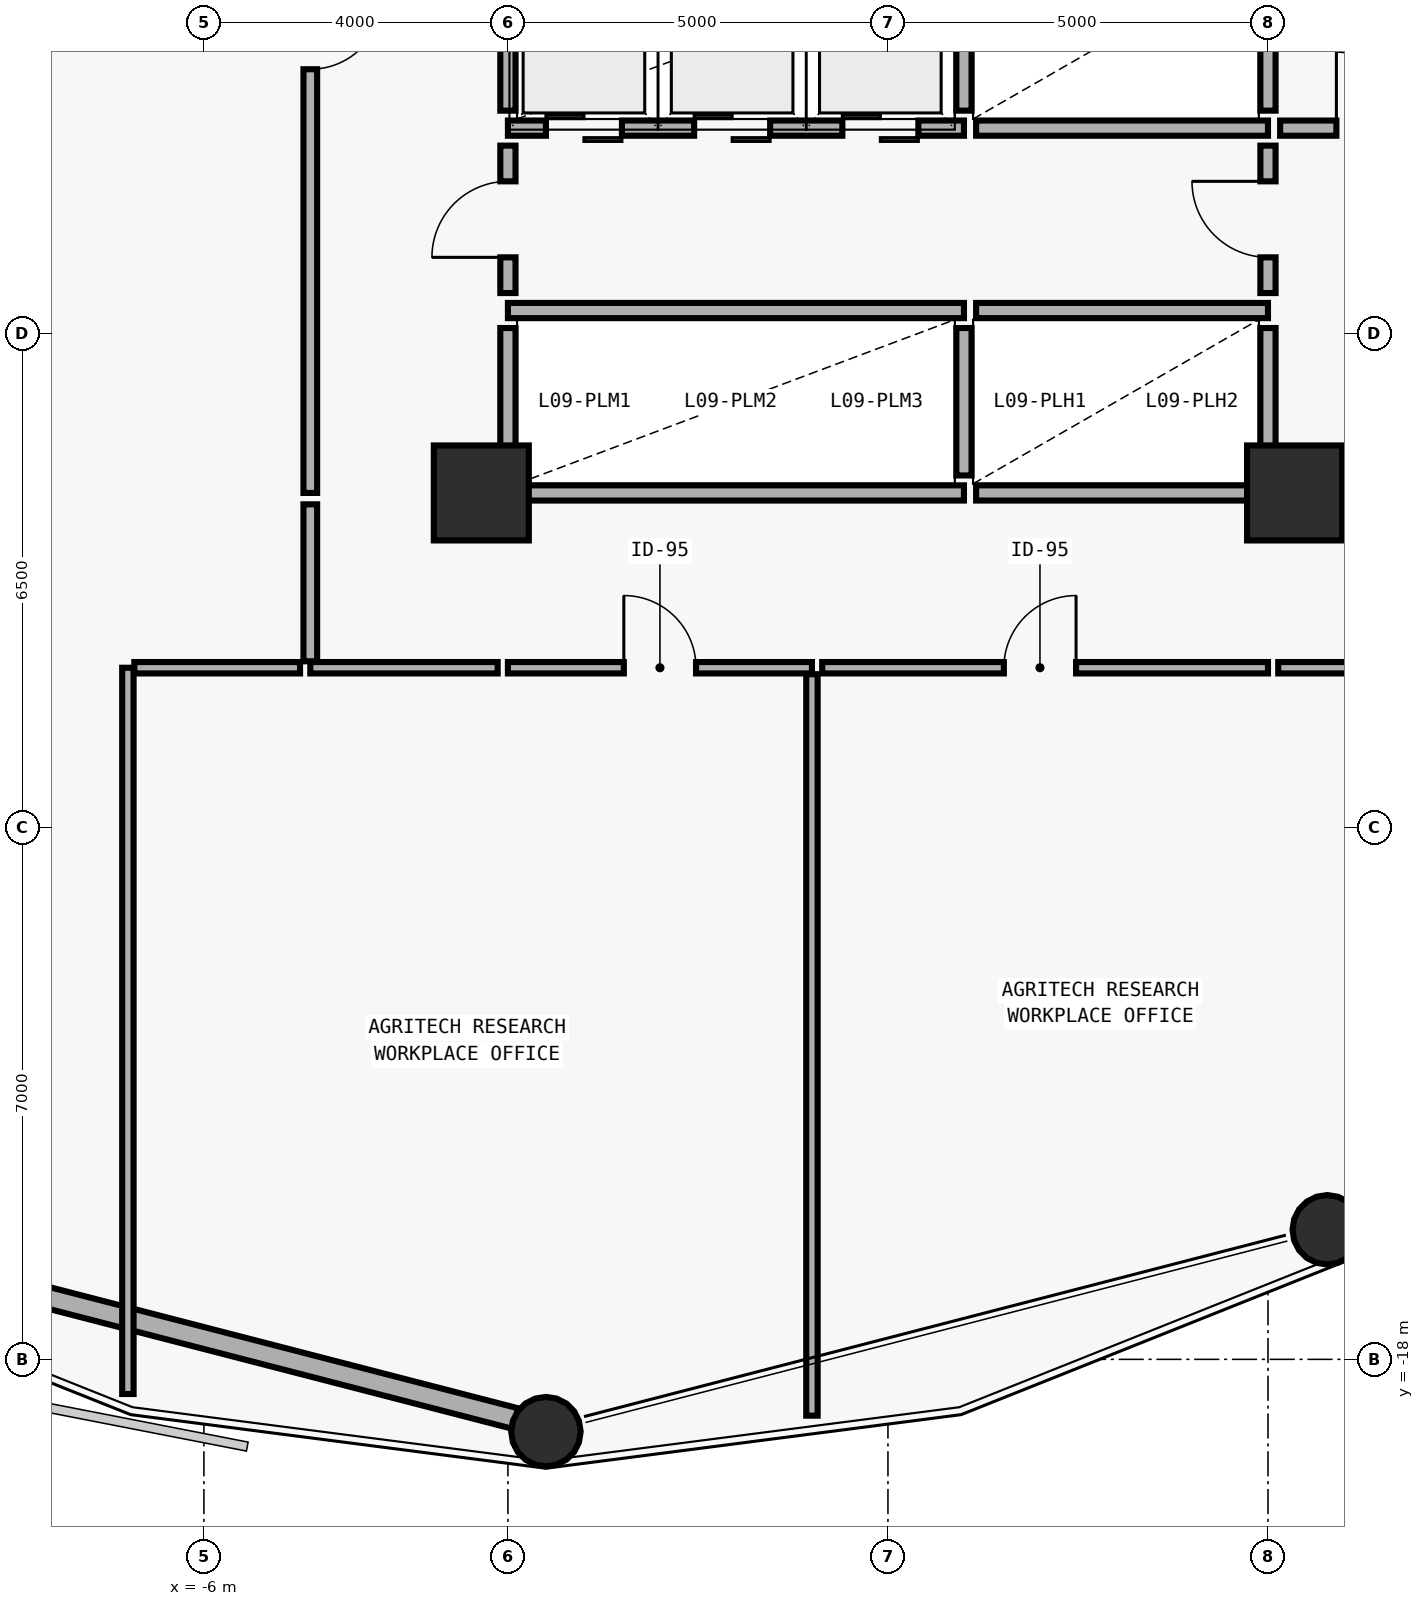
"""IFC4 building model, lengths in metres.
Left out: names, types, materials, properties, quantities, classifications, styles, units other than length and angle.
Written with IfcOpenShell. Run it as: python <this file> out.ifc"""

import sys

from ifc_helpers import new_model, si_unit, direction, frame, frame_2d, origin, origin_2d, place, context, subcontext, project, spatial, rectangle, hollow_circle, extrude, element, fill, save


model = new_model("IFC4")
c1 = context("Model", 3, precision=1e-05, world=origin(), true_north=direction((0.0, 1.0)))
c2 = subcontext(c1, "Body", "Model", "MODEL_VIEW")
j1 = project(units=[si_unit("LENGTHUNIT", "METRE"), si_unit("PLANEANGLEUNIT", "RADIAN")], contexts=[c1])
p1 = place(None, origin())
s1 = spatial("IfcSite", under=j1, at=p1, CompositionType="ELEMENT")
p2 = place(p1, origin())
s2 = spatial("IfcBuilding", under=s1, at=p2, CompositionType="ELEMENT")
p3 = place(p2, frame((0.0, 0.0, 39.3)))
s3 = spatial("IfcBuildingStorey", under=s2, at=p3, CompositionType="ELEMENT", Elevation=39.3)
for number, where, z_axis, x_axis in (
    (1, (-2.35, -6.6, 0.0), (0.0, 0.0, 1.0), (1.0, 0.0, 0.0)),
    (2, (8.35, -6.6, 0.0), (0.0, 0.0, 1.0), (1.0, 0.0, 0.0)),
):
    element("IfcColumn", number, at=place(p3, frame(where, z_axis=z_axis, x_axis=x_axis)), inside=s3, PredefinedType="COLUMN", context=c2, shape_type="SweptSolid", body=[
        extrude(rectangle(XDim=1.25, YDim=1.25, at=origin_2d()), origin(), (0.0, 0.0, 1.0), 3.875),
    ])
p4 = place(p3, frame((-1.5, -18.883, 0.0), z_axis=(0.0, -0.03507165661, 0.999384800216), x_axis=(1.0, 0.0, 0.0)))
e3 = element("IfcColumn", 3, at=p4, inside=s3, PredefinedType="COLUMN", context=c2, shape_type="SweptSolid", body=[
    extrude(hollow_circle(Radius=0.457, WallThickness=0.032, at=origin_2d()), origin(), (0.0, 0.0, 1.0), 3.877),
])
p5 = place(p3, frame((8.736, -16.236, 0.0), z_axis=(0.022665133029, -0.030409053481, 0.999280531788), x_axis=(0.801789249334, 0.597606893913, 0.0)))
e4 = element("IfcColumn", 4, at=p5, inside=s3, PredefinedType="COLUMN", context=c2, shape_type="SweptSolid", body=[
    extrude(hollow_circle(Radius=0.457, WallThickness=0.032, at=origin_2d()), origin(), (0.0, 0.0, 1.0), 3.878),
])
p6 = place(p3, frame((-1.899, -18.78, 0.0), z_axis=(0.0, 0.0, 1.0), x_axis=(-0.968156017529, 0.250347609779, 0.0)))
e5 = element("IfcWall", 5, at=p6, inside=s3, PredefinedType="SOLIDWALL", context=c2, shape_type="SweptSolid", body=[
    extrude(rectangle(XDim=9.748, YDim=0.28, at=frame_2d((4.874, 0.0))), origin(), (0.0, 0.0, 1.0), 3.06),
])
p7 = place(p3, frame((-2.0, -1.8, 0.0), z_axis=(0.0, 0.0, 1.0), x_axis=(1.0, 0.0, 0.0)))
e6 = element("IfcWall", 6, at=p7, inside=s3, PredefinedType="SOLIDWALL", context=c2, shape_type="SweptSolid", body=[
    extrude(rectangle(XDim=6.0, YDim=0.2, at=frame_2d((3.0, 0.0))), origin(), (0.0, 0.0, 1.0), 3.64),
])
p8 = place(p7, frame((0.5, 0.0, 0.0)))
e7 = element("IfcOpeningElement", 7, at=p8, cuts=e6, PredefinedType="OPENING", context=c2, shape_type="SweptSolid", body=[
    extrude(rectangle(XDim=1.0, YDim=2.2, at=frame_2d((0.5, 1.1))), frame((0.0, 0.11, 0.0), z_axis=(0.0, -1.0, 0.0), x_axis=(1.0, 0.0, 0.0)), (0.0, 0.0, 1.0), 0.22),
])
p9 = place(p7, frame((2.45, 0.0, 0.0)))
e8 = element("IfcOpeningElement", 8, at=p9, cuts=e6, PredefinedType="OPENING", context=c2, shape_type="SweptSolid", body=[
    extrude(rectangle(XDim=1.0, YDim=2.2, at=frame_2d((0.5, 1.1))), frame((0.0, 0.11, 0.0), z_axis=(0.0, -1.0, 0.0), x_axis=(1.0, 0.0, 0.0)), (0.0, 0.0, 1.0), 0.22),
])
p10 = place(p7, frame((4.4, 0.0, 0.0)))
e9 = element("IfcOpeningElement", 9, at=p10, cuts=e6, PredefinedType="OPENING", context=c2, shape_type="SweptSolid", body=[
    extrude(rectangle(XDim=1.0, YDim=2.2, at=frame_2d((0.5, 1.1))), frame((0.0, 0.11, 0.0), z_axis=(0.0, -1.0, 0.0), x_axis=(1.0, 0.0, 0.0)), (0.0, 0.0, 1.0), 0.22),
])
p11 = place(p3, frame((-2.0, -1.57, 0.0), z_axis=(0.0, 0.0, 1.0), x_axis=(0.0, 1.0, 0.0)))
e10 = element("IfcWall", 10, at=p11, inside=s3, PredefinedType="SOLIDWALL", context=c2, shape_type="SweptSolid", body=[
    extrude(rectangle(XDim=2.05, YDim=0.2, at=frame_2d((1.025, 0.0))), origin(), (0.0, 0.0, 1.0), 3.022),
])
p12 = place(p3, frame((4.16, -1.8, 0.0), z_axis=(0.0, 0.0, 1.0), x_axis=(1.0, 0.0, 0.0)))
e11 = element("IfcWall", 11, at=p12, inside=s3, PredefinedType="SOLIDWALL", context=c2, shape_type="SweptSolid", body=[
    extrude(rectangle(XDim=3.84, YDim=0.2, at=frame_2d((1.92, 0.0))), origin(), (0.0, 0.0, 1.0), 3.64),
])
p13 = place(p3, frame((4.0, -1.57, 0.0), z_axis=(0.0, 0.0, 1.0), x_axis=(0.0, 1.0, 0.0)))
e12 = element("IfcWall", 12, at=p13, inside=s3, PredefinedType="SOLIDWALL", context=c2, shape_type="SweptSolid", body=[
    extrude(rectangle(XDim=1.94, YDim=0.2, at=frame_2d((0.97, 0.0))), origin(), (0.0, 0.0, 1.0), 3.64),
])
p14 = place(p3, frame((8.0, -1.57, 0.0), z_axis=(0.0, 0.0, 1.0), x_axis=(0.0, 1.0, 0.0)))
e13 = element("IfcWall", 13, at=p14, inside=s3, PredefinedType="SOLIDWALL", context=c2, shape_type="SweptSolid", body=[
    extrude(rectangle(XDim=2.05, YDim=0.2, at=frame_2d((1.025, 0.0))), origin(), (0.0, 0.0, 1.0), 3.072),
])
p15 = place(p3, frame((-2.0, -4.2, 0.0), z_axis=(0.0, 0.0, 1.0), x_axis=(1.0, 0.0, 0.0)))
e14 = element("IfcWall", 14, at=p15, inside=s3, PredefinedType="SOLIDWALL", context=c2, shape_type="SweptSolid", body=[
    extrude(rectangle(XDim=6.0, YDim=0.2, at=frame_2d((3.0, 0.0))), origin(), (0.0, 0.0, 1.0), 3.64),
])
p16 = place(p3, frame((-2.0, -6.6, 0.0), z_axis=(0.0, 0.0, 1.0), x_axis=(1.0, 0.0, 0.0)))
e15 = element("IfcWall", 15, at=p16, inside=s3, PredefinedType="SOLIDWALL", context=c2, shape_type="SweptSolid", body=[
    extrude(rectangle(XDim=6.0, YDim=0.2, at=frame_2d((3.0, 0.0))), origin(), (0.0, 0.0, 1.0), 3.122),
])
p17 = place(p3, frame((-2.0, -6.37, 0.0), z_axis=(0.0, 0.0, 1.0), x_axis=(0.0, 1.0, 0.0)))
e16 = element("IfcWall", 16, at=p17, inside=s3, PredefinedType="SOLIDWALL", context=c2, shape_type="SweptSolid", body=[
    extrude(rectangle(XDim=1.94, YDim=0.2, at=frame_2d((0.97, 0.0))), origin(), (0.0, 0.0, 1.0), 3.022),
])
p18 = place(p3, frame((4.16, -4.2, 0.0), z_axis=(0.0, 0.0, 1.0), x_axis=(1.0, 0.0, 0.0)))
e17 = element("IfcWall", 17, at=p18, inside=s3, PredefinedType="SOLIDWALL", context=c2, shape_type="SweptSolid", body=[
    extrude(rectangle(XDim=3.84, YDim=0.2, at=frame_2d((1.92, 0.0))), origin(), (0.0, 0.0, 1.0), 3.64),
])
p19 = place(p3, frame((4.16, -6.6, 0.0), z_axis=(0.0, 0.0, 1.0), x_axis=(1.0, 0.0, 0.0)))
e18 = element("IfcWall", 18, at=p19, inside=s3, PredefinedType="SOLIDWALL", context=c2, shape_type="SweptSolid", body=[
    extrude(rectangle(XDim=3.84, YDim=0.2, at=frame_2d((1.92, 0.0))), origin(), (0.0, 0.0, 1.0), 3.122),
])
p20 = place(p3, frame((4.0, -6.37, 0.0), z_axis=(0.0, 0.0, 1.0), x_axis=(0.0, 1.0, 0.0)))
e19 = element("IfcWall", 19, at=p20, inside=s3, PredefinedType="SOLIDWALL", context=c2, shape_type="SweptSolid", body=[
    extrude(rectangle(XDim=1.94, YDim=0.2, at=frame_2d((0.97, 0.0))), origin(), (0.0, 0.0, 1.0), 3.64),
])
p21 = place(p3, frame((8.0, -6.37, 0.0), z_axis=(0.0, 0.0, 1.0), x_axis=(0.0, 1.0, 0.0)))
e20 = element("IfcWall", 20, at=p21, inside=s3, PredefinedType="SOLIDWALL", context=c2, shape_type="SweptSolid", body=[
    extrude(rectangle(XDim=1.94, YDim=0.2, at=frame_2d((0.97, 0.0))), origin(), (0.0, 0.0, 1.0), 3.072),
])
p22 = place(p3, frame((-2.0, -3.97, 0.0), z_axis=(0.0, 0.0, 1.0), x_axis=(0.0, 1.0, 0.0)))
e21 = element("IfcWall", 21, at=p22, inside=s3, PredefinedType="MOVABLE", context=c2, shape_type="SweptSolid", body=[
    extrude(rectangle(XDim=1.94, YDim=0.2, at=frame_2d((0.97, 0.0))), origin(), (0.0, 0.0, 1.0), 3.022),
])
p23 = place(p22, frame((0.47, 0.0, 0.0)))
e22 = element("IfcOpeningElement", 22, at=p23, cuts=e21, PredefinedType="OPENING", context=c2, shape_type="SweptSolid", body=[
    extrude(rectangle(XDim=1.0, YDim=2.1, at=frame_2d((0.5, 1.05))), frame((0.0, 0.11, 0.0), z_axis=(0.0, -1.0, 0.0), x_axis=(1.0, 0.0, 0.0)), (0.0, 0.0, 1.0), 0.22),
])
p24 = place(p3, frame((8.0, -3.97, 0.0), z_axis=(0.0, 0.0, 1.0), x_axis=(0.0, 1.0, 0.0)))
e23 = element("IfcWall", 23, at=p24, inside=s3, PredefinedType="MOVABLE", context=c2, shape_type="SweptSolid", body=[
    extrude(rectangle(XDim=1.94, YDim=0.2, at=frame_2d((0.97, 0.0))), origin(), (0.0, 0.0, 1.0), 3.072),
])
p25 = place(p24, frame((0.47, 0.0, 0.0)))
e24 = element("IfcOpeningElement", 24, at=p25, cuts=e23, PredefinedType="OPENING", context=c2, shape_type="SweptSolid", body=[
    extrude(rectangle(XDim=1.0, YDim=2.1, at=frame_2d((0.5, 1.05))), frame((0.0, 0.11, 0.0), z_axis=(0.0, -1.0, 0.0), x_axis=(1.0, 0.0, 0.0)), (0.0, 0.0, 1.0), 0.22),
])
p26 = place(p3, frame((8.16, -1.8, 0.0), z_axis=(0.0, 0.0, 1.0), x_axis=(1.0, 0.0, 0.0)))
e25 = element("IfcWall", 25, at=p26, inside=s3, PredefinedType="MOVABLE", context=c2, shape_type="SweptSolid", body=[
    extrude(rectangle(XDim=2.64, YDim=0.2, at=frame_2d((1.32, 0.0))), origin(), (0.0, 0.0, 1.0), 3.64),
])
p27 = place(p26, frame((0.74, 0.0, 0.0)))
e26 = element("IfcOpeningElement", 26, at=p27, cuts=e25, PredefinedType="OPENING", context=c2, shape_type="SweptSolid", body=[
    extrude(rectangle(XDim=1.0, YDim=2.1, at=frame_2d((0.5, 1.05))), frame((0.0, 0.11, 0.0), z_axis=(0.0, -1.0, 0.0), x_axis=(1.0, 0.0, 0.0)), (0.0, 0.0, 1.0), 0.22),
])
p28 = place(p3, frame((-2.0, -8.9, 0.0), z_axis=(0.0, 0.0, 1.0), x_axis=(1.0, 0.0, 0.0)))
e27 = element("IfcWall", 27, at=p28, inside=s3, PredefinedType="PARTITIONING", context=c2, shape_type="SweptSolid", body=[
    extrude(rectangle(XDim=4.0, YDim=0.15, at=frame_2d((2.0, 0.0))), origin(), (0.0, 0.0, 1.0), 3.64),
])
p29 = place(p28, frame((1.525, 0.0, 0.0)))
e28 = element("IfcOpeningElement", 28, at=p29, cuts=e27, PredefinedType="OPENING", context=c2, shape_type="SweptSolid", body=[
    extrude(rectangle(XDim=0.95, YDim=2.1, at=frame_2d((0.475, 1.05))), frame((0.0, 0.085, 0.0), z_axis=(0.0, -1.0, 0.0), x_axis=(1.0, 0.0, 0.0)), (0.0, 0.0, 1.0), 0.17),
])
p30 = place(p3, frame((2.135, -8.9, 0.0), z_axis=(0.0, 0.0, 1.0), x_axis=(1.0, 0.0, 0.0)))
e29 = element("IfcWall", 29, at=p30, inside=s3, PredefinedType="PARTITIONING", context=c2, shape_type="SweptSolid", body=[
    extrude(rectangle(XDim=5.865, YDim=0.15, at=frame_2d((2.933, 0.0))), origin(), (0.0, 0.0, 1.0), 3.64),
])
p31 = place(p30, frame((2.39, 0.0, 0.0)))
e30 = element("IfcOpeningElement", 30, at=p31, cuts=e29, PredefinedType="OPENING", context=c2, shape_type="SweptSolid", body=[
    extrude(rectangle(XDim=0.95, YDim=2.1, at=frame_2d((0.475, 1.05))), frame((0.0, 0.085, 0.0), z_axis=(0.0, -1.0, 0.0), x_axis=(1.0, 0.0, 0.0)), (0.0, 0.0, 1.0), 0.17),
])
p32 = place(p3, frame((-4.6, 5.5, 0.0), z_axis=(0.0, 0.0, 1.0), x_axis=(0.0, -1.0, 0.0)))
e31 = element("IfcWall", 31, at=p32, inside=s3, PredefinedType="PLUMBINGWALL", context=c2, shape_type="SweptSolid", body=[
    extrude(rectangle(XDim=12.1, YDim=0.18, at=frame_2d((6.05, 0.0))), origin(), (0.0, 0.0, 1.0), 3.64),
])
p33 = place(p32, frame((5.575, 0.0, 0.0)))
e32 = element("IfcOpeningElement", 32, at=p33, cuts=e31, PredefinedType="OPENING", context=c2, shape_type="SweptSolid", body=[
    extrude(rectangle(XDim=0.95, YDim=2.1, at=frame_2d((0.475, 1.05))), frame((0.0, 0.1, 0.0), z_axis=(0.0, -1.0, 0.0), x_axis=(1.0, 0.0, 0.0)), (0.0, 0.0, 1.0), 0.2),
])
p34 = place(p3, frame((-4.6, -8.9, 0.0), z_axis=(0.0, 0.0, 1.0), x_axis=(1.0, 0.0, 0.0)))
e33 = element("IfcWall", 33, at=p34, inside=s3, PredefinedType="PARTITIONING", context=c2, shape_type="SweptSolid", body=[
    extrude(rectangle(XDim=2.465, YDim=0.15, at=frame_2d((1.232, 0.0))), origin(), (0.0, 0.0, 1.0), 3.64),
])
p35 = place(p3, frame((2.0, -8.985, 0.0), z_axis=(0.0, 0.0, 1.0), x_axis=(0.0, -1.0, 0.0)))
e34 = element("IfcWall", 34, at=p35, inside=s3, PredefinedType="PARTITIONING", context=c2, shape_type="SweptSolid", body=[
    extrude(rectangle(XDim=9.756, YDim=0.15, at=frame_2d((4.878, 0.0))), origin(), (0.0, 0.0, 1.0), 3.64),
])
p36 = place(p3, frame((-7.0, -18.456, 0.0), z_axis=(0.0, 0.0, 1.0), x_axis=(0.0, 1.0, 0.0)))
e35 = element("IfcWall", 35, at=p36, inside=s3, PredefinedType="PARTITIONING", context=c2, shape_type="SweptSolid", body=[
    extrude(rectangle(XDim=9.556, YDim=0.15, at=frame_2d((4.778, 0.0))), origin(), (0.0, 0.0, 1.0), 3.64),
])
p37 = place(p3, frame((-6.915, -8.9, 0.0), z_axis=(0.0, 0.0, 1.0), x_axis=(1.0, 0.0, 0.0)))
e36 = element("IfcWall", 36, at=p37, inside=s3, PredefinedType="PARTITIONING", context=c2, shape_type="SweptSolid", body=[
    extrude(rectangle(XDim=2.18, YDim=0.15, at=frame_2d((1.09, 0.0))), origin(), (0.0, 0.0, 1.0), 3.64),
])
p38 = place(p3, frame((8.135, -8.9, 0.0), z_axis=(0.0, 0.0, 1.0), x_axis=(1.0, 0.0, 0.0)))
e37 = element("IfcWall", 37, at=p38, inside=s3, PredefinedType="PARTITIONING", context=c2, shape_type="SweptSolid", body=[
    extrude(rectangle(XDim=2.665, YDim=0.15, at=frame_2d((1.333, 0.0))), origin(), (0.0, 0.0, 1.0), 3.64),
])
p39 = place(p3, frame((-4.6, -6.75, 0.0), z_axis=(0.0, 0.0, 1.0), x_axis=(0.0, -1.0, 0.0)))
e38 = element("IfcWall", 38, at=p39, inside=s3, PredefinedType="PLUMBINGWALL", context=c2, shape_type="SweptSolid", body=[
    extrude(rectangle(XDim=2.065, YDim=0.18, at=frame_2d((1.032, 0.0))), origin(), (0.0, 0.0, 1.0), 3.64),
])
p40 = place(p23, origin())
e39 = element("IfcDoor", 39, at=p40, inside=s3, OperationType="SINGLE_SWING_LEFT", PredefinedType="DOOR", context=c2, shape_type="SweptSolid", body=[
    extrude(rectangle(XDim=1.0, YDim=2.1, at=frame_2d((0.5, 1.05))), frame((0.0, 0.025, 0.0), z_axis=(0.0, -1.0, 0.0), x_axis=(1.0, 0.0, 0.0)), (0.0, 0.0, 1.0), 0.05),
])
fill(e22, e39)
p41 = place(p25, origin())
e40 = element("IfcDoor", 40, at=p41, inside=s3, OperationType="SINGLE_SWING_RIGHT", PredefinedType="DOOR", context=c2, shape_type="SweptSolid", body=[
    extrude(rectangle(XDim=1.0, YDim=2.1, at=frame_2d((0.5, 1.05))), frame((0.0, 0.025, 0.0), z_axis=(0.0, -1.0, 0.0), x_axis=(1.0, 0.0, 0.0)), (0.0, 0.0, 1.0), 0.05),
])
fill(e24, e40)
p42 = place(p27, origin())
e41 = element("IfcDoor", 41, at=p42, inside=s3, OperationType="SINGLE_SWING_LEFT", PredefinedType="DOOR", context=c2, shape_type="SweptSolid", body=[
    extrude(rectangle(XDim=1.0, YDim=2.1, at=frame_2d((0.5, 1.05))), frame((0.0, 0.025, 0.0), z_axis=(0.0, -1.0, 0.0), x_axis=(1.0, 0.0, 0.0)), (0.0, 0.0, 1.0), 0.05),
])
fill(e26, e41)
p43 = place(p29, origin())
e42 = element("IfcDoor", 42, at=p43, inside=s3, OperationType="SINGLE_SWING_LEFT", PredefinedType="DOOR", context=c2, shape_type="SweptSolid", body=[
    extrude(rectangle(XDim=0.95, YDim=2.1, at=frame_2d((0.475, 1.05))), frame((0.0, 0.025, 0.0), z_axis=(0.0, -1.0, 0.0), x_axis=(1.0, 0.0, 0.0)), (0.0, 0.0, 1.0), 0.05),
])
fill(e28, e42)
p44 = place(p31, origin())
e43 = element("IfcDoor", 43, at=p44, inside=s3, OperationType="SINGLE_SWING_RIGHT", PredefinedType="DOOR", context=c2, shape_type="SweptSolid", body=[
    extrude(rectangle(XDim=0.95, YDim=2.1, at=frame_2d((0.475, 1.05))), frame((0.0, 0.025, 0.0), z_axis=(0.0, -1.0, 0.0), x_axis=(1.0, 0.0, 0.0)), (0.0, 0.0, 1.0), 0.05),
])
fill(e30, e43)
p45 = place(p33, origin())
e44 = element("IfcDoor", 44, at=p45, inside=s3, OperationType="SINGLE_SWING_LEFT", PredefinedType="DOOR", context=c2, shape_type="SweptSolid", body=[
    extrude(rectangle(XDim=0.95, YDim=2.1, at=frame_2d((0.475, 1.05))), frame((0.0, 0.025, 0.0), z_axis=(0.0, -1.0, 0.0), x_axis=(1.0, 0.0, 0.0)), (0.0, 0.0, 1.0), 0.05),
])
fill(e32, e44)
p46 = place(p8, origin())
e45 = element("IfcDoor", 45, at=p46, inside=s3, OperationType="DOUBLE_DOOR_SLIDING", PredefinedType="DOOR", context=c2, shape_type="SweptSolid", body=[
    extrude(rectangle(XDim=1.0, YDim=2.2, at=frame_2d((0.5, 1.1))), frame((0.0, 0.025, 0.0), z_axis=(0.0, -1.0, 0.0), x_axis=(1.0, 0.0, 0.0)), (0.0, 0.0, 1.0), 0.05),
])
fill(e7, e45)
p47 = place(p9, origin())
e46 = element("IfcDoor", 46, at=p47, inside=s3, OperationType="DOUBLE_DOOR_SLIDING", PredefinedType="DOOR", context=c2, shape_type="SweptSolid", body=[
    extrude(rectangle(XDim=1.0, YDim=2.2, at=frame_2d((0.5, 1.1))), frame((0.0, 0.025, 0.0), z_axis=(0.0, -1.0, 0.0), x_axis=(1.0, 0.0, 0.0)), (0.0, 0.0, 1.0), 0.05),
])
fill(e8, e46)
p48 = place(p10, origin())
e47 = element("IfcDoor", 47, at=p48, inside=s3, OperationType="DOUBLE_DOOR_SLIDING", PredefinedType="DOOR", context=c2, shape_type="SweptSolid", body=[
    extrude(rectangle(XDim=1.0, YDim=2.2, at=frame_2d((0.5, 1.1))), frame((0.0, 0.025, 0.0), z_axis=(0.0, -1.0, 0.0), x_axis=(1.0, 0.0, 0.0)), (0.0, 0.0, 1.0), 0.05),
])
fill(e9, e47)
save(model, sys.argv[1])
